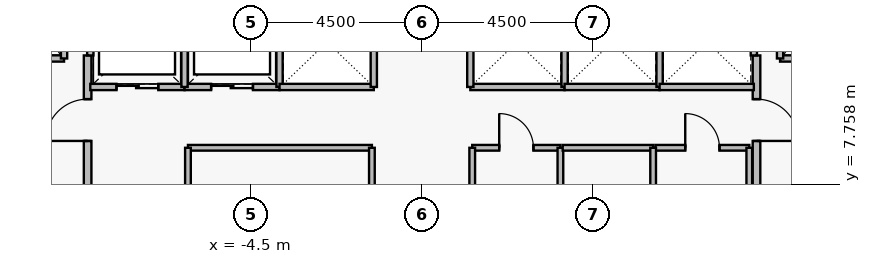
"""IFC4 building model, lengths in metres.
Left out: names, types, materials, properties, quantities, classifications, styles, units other than length and angle.
Written with IfcOpenShell. Run it as: python <this file> out.ifc"""

import sys

from ifc_helpers import new_model, si_unit, direction, frame, frame_2d, origin, place, context, subcontext, project, spatial, rectangle, extrude, element, fill, save


model = new_model("IFC4")
c1 = context("Model", 3, precision=1e-05, world=origin(), true_north=direction((0.0, 1.0)))
c2 = subcontext(c1, "Body", "Model", "MODEL_VIEW")
j1 = project(units=[si_unit("LENGTHUNIT", "METRE"), si_unit("PLANEANGLEUNIT", "RADIAN")], contexts=[c1])
p1 = place(None, origin())
s1 = spatial("IfcSite", under=j1, at=p1, CompositionType="ELEMENT")
p2 = place(p1, origin())
s2 = spatial("IfcBuilding", under=s1, at=p2, CompositionType="ELEMENT")
p3 = place(p2, frame((0.0, 0.0, 99.3)))
s3 = spatial("IfcBuildingStorey", under=s2, at=p3, CompositionType="ELEMENT", Elevation=99.3)
p4 = place(p3, frame((-8.8, 5.05, 0.0), z_axis=(0.0, 0.0, 1.0), x_axis=(0.0, 1.0, 0.0)))
e1 = element("IfcWall", 1, at=p4, inside=s3, PredefinedType="PARTITIONING", context=c2, shape_type="SweptSolid", body=[
    extrude(rectangle(XDim=6.1, YDim=0.2, at=frame_2d((3.05, 0.0))), origin(), (0.0, 0.0, 1.0), 3.43),
])
p5 = place(p4, frame((0.25, 0.0, 0.0)))
e2 = element("IfcOpeningElement", 2, at=p5, cuts=e1, PredefinedType="OPENING", context=c2, shape_type="SweptSolid", body=[
    extrude(rectangle(XDim=1.1, YDim=2.2, at=frame_2d((0.55, 1.1))), frame((0.0, 0.11, 0.0), z_axis=(0.0, -1.0, 0.0), x_axis=(1.0, 0.0, 0.0)), (0.0, 0.0, 1.0), 0.22),
])
p6 = place(p4, frame((3.85, 0.0, 0.0)))
e3 = element("IfcOpeningElement", 3, at=p6, cuts=e1, PredefinedType="OPENING", context=c2, shape_type="SweptSolid", body=[
    extrude(rectangle(XDim=1.1, YDim=2.2, at=frame_2d((0.55, 1.1))), frame((0.0, 0.11, 0.0), z_axis=(0.0, -1.0, 0.0), x_axis=(1.0, 0.0, 0.0)), (0.0, 0.0, 1.0), 0.22),
])
p7 = place(p3, frame((8.8, 11.15, 0.0), z_axis=(0.0, 0.0, 1.0), x_axis=(0.0, -1.0, 0.0)))
e4 = element("IfcWall", 4, at=p7, inside=s3, PredefinedType="PARTITIONING", context=c2, shape_type="SweptSolid", body=[
    extrude(rectangle(XDim=6.1, YDim=0.2, at=frame_2d((3.05, 0.0))), origin(), (0.0, 0.0, 1.0), 3.43),
])
p8 = place(p7, frame((1.15, 0.0, 0.0)))
e5 = element("IfcOpeningElement", 5, at=p8, cuts=e4, PredefinedType="OPENING", context=c2, shape_type="SweptSolid", body=[
    extrude(rectangle(XDim=1.1, YDim=2.2, at=frame_2d((0.55, 1.1))), frame((0.0, 0.11, 0.0), z_axis=(0.0, -1.0, 0.0), x_axis=(1.0, 0.0, 0.0)), (0.0, 0.0, 1.0), 0.22),
])
p9 = place(p7, frame((4.75, 0.0, 0.0)))
e6 = element("IfcOpeningElement", 6, at=p9, cuts=e4, PredefinedType="OPENING", context=c2, shape_type="SweptSolid", body=[
    extrude(rectangle(XDim=1.1, YDim=2.2, at=frame_2d((0.55, 1.1))), frame((0.0, 0.11, 0.0), z_axis=(0.0, -1.0, 0.0), x_axis=(1.0, 0.0, 0.0)), (0.0, 0.0, 1.0), 0.22),
])
p10 = place(p3, frame((-11.58, 11.07, 0.0), z_axis=(0.0, 0.0, 1.0), x_axis=(1.0, 0.0, 0.0)))
e7 = element("IfcWall", 7, at=p10, inside=s3, PredefinedType="PARTITIONING", context=c2, shape_type="SweptSolid", body=[
    extrude(rectangle(XDim=2.16, YDim=0.165, at=frame_2d((1.08, 0.0))), origin(), (0.0, 0.0, 1.0), 3.43),
])
p11 = place(p10, frame((0.53, 0.0, 0.0)))
e8 = element("IfcOpeningElement", 8, at=p11, cuts=e7, PredefinedType="OPENING", context=c2, shape_type="SweptSolid", body=[
    extrude(rectangle(XDim=1.15, YDim=2.25, at=frame_2d((0.575, 1.125))), frame((0.0, 0.093, 0.0), z_axis=(0.0, -1.0, 0.0), x_axis=(1.0, 0.0, 0.0)), (0.0, 0.0, 1.0), 0.185),
])
p12 = place(p3, frame((9.42, 11.07, 0.0), z_axis=(0.0, 0.0, 1.0), x_axis=(1.0, 0.0, 0.0)))
e9 = element("IfcWall", 9, at=p12, inside=s3, PredefinedType="PARTITIONING", context=c2, shape_type="SweptSolid", body=[
    extrude(rectangle(XDim=2.16, YDim=0.165, at=frame_2d((1.08, 0.0))), origin(), (0.0, 0.0, 1.0), 3.43),
])
p13 = place(p12, frame((0.53, 0.0, 0.0)))
e10 = element("IfcOpeningElement", 10, at=p13, cuts=e9, PredefinedType="OPENING", context=c2, shape_type="SweptSolid", body=[
    extrude(rectangle(XDim=1.15, YDim=2.25, at=frame_2d((0.575, 1.125))), frame((0.0, 0.093, 0.0), z_axis=(0.0, -1.0, 0.0), x_axis=(1.0, 0.0, 0.0)), (0.0, 0.0, 1.0), 0.185),
])
p14 = place(p3, frame((-8.73, 10.32, 0.0), z_axis=(0.0, 0.0, 1.0), x_axis=(1.0, 0.0, 0.0)))
e11 = element("IfcWall", 11, at=p14, inside=s3, PredefinedType="PARTITIONING", context=c2, shape_type="SweptSolid", body=[
    extrude(rectangle(XDim=2.48, YDim=0.165, at=frame_2d((1.24, 0.0))), origin(), (0.0, 0.0, 1.0), 3.43),
])
p15 = place(p14, frame((0.69, 0.0, 0.0)))
e12 = element("IfcOpeningElement", 12, at=p15, cuts=e11, PredefinedType="OPENING", context=c2, shape_type="SweptSolid", body=[
    extrude(rectangle(XDim=1.1, YDim=2.25, at=frame_2d((0.55, 1.125))), frame((0.0, 0.093, 0.0), z_axis=(0.0, -1.0, 0.0), x_axis=(1.0, 0.0, 0.0)), (0.0, 0.0, 1.0), 0.185),
])
p16 = place(p3, frame((-6.25, 10.32, 0.0), z_axis=(0.0, 0.0, 1.0), x_axis=(1.0, 0.0, 0.0)))
e13 = element("IfcWall", 13, at=p16, inside=s3, PredefinedType="PARTITIONING", context=c2, shape_type="SweptSolid", body=[
    extrude(rectangle(XDim=2.5, YDim=0.165, at=frame_2d((1.25, 0.0))), origin(), (0.0, 0.0, 1.0), 3.43),
])
p17 = place(p16, frame((0.7, 0.0, 0.0)))
e14 = element("IfcOpeningElement", 14, at=p17, cuts=e13, PredefinedType="OPENING", context=c2, shape_type="SweptSolid", body=[
    extrude(rectangle(XDim=1.1, YDim=2.25, at=frame_2d((0.55, 1.125))), frame((0.0, 0.093, 0.0), z_axis=(0.0, -1.0, 0.0), x_axis=(1.0, 0.0, 0.0)), (0.0, 0.0, 1.0), 0.185),
])
p18 = place(p3, frame((1.32, 8.72, 0.0), z_axis=(0.0, 0.0, 1.0), x_axis=(1.0, 0.0, 0.0)))
e15 = element("IfcWall", 15, at=p18, inside=s3, PredefinedType="PARTITIONING", context=c2, shape_type="SweptSolid", body=[
    extrude(rectangle(XDim=2.32, YDim=0.15, at=frame_2d((1.16, 0.0))), origin(), (0.0, 0.0, 1.0), 3.43),
])
p19 = place(p18, frame((0.71, 0.0, 0.0)))
e16 = element("IfcOpeningElement", 16, at=p19, cuts=e15, PredefinedType="OPENING", context=c2, shape_type="SweptSolid", body=[
    extrude(rectangle(XDim=0.9, YDim=2.15, at=frame_2d((0.45, 1.075))), frame((0.0, 0.085, 0.0), z_axis=(0.0, -1.0, 0.0), x_axis=(1.0, 0.0, 0.0)), (0.0, 0.0, 1.0), 0.17),
])
p20 = place(p3, frame((6.14, 8.72, 0.0), z_axis=(0.0, 0.0, 1.0), x_axis=(1.0, 0.0, 0.0)))
e17 = element("IfcWall", 17, at=p20, inside=s3, PredefinedType="PARTITIONING", context=c2, shape_type="SweptSolid", body=[
    extrude(rectangle(XDim=2.47, YDim=0.15, at=frame_2d((1.235, 0.0))), origin(), (0.0, 0.0, 1.0), 3.43),
])
p21 = place(p20, frame((0.785, 0.0, 0.0)))
e18 = element("IfcOpeningElement", 18, at=p21, cuts=e17, PredefinedType="OPENING", context=c2, shape_type="SweptSolid", body=[
    extrude(rectangle(XDim=0.9, YDim=2.15, at=frame_2d((0.45, 1.075))), frame((0.0, 0.085, 0.0), z_axis=(0.0, -1.0, 0.0), x_axis=(1.0, 0.0, 0.0)), (0.0, 0.0, 1.0), 0.17),
])
for number, where, z_axis, x_axis in (
    (19, (-9.42, 11.07, 0.0), (0.0, 0.0, 1.0), (0.0, 1.0, 0.0)),
    (20, (9.42, 11.07, 0.0), (0.0, 0.0, 1.0), (0.0, 1.0, 0.0)),
):
    element("IfcWall", number, at=place(p3, frame(where, z_axis=z_axis, x_axis=x_axis)), inside=s3, PredefinedType="PARTITIONING", context=c2, shape_type="SweptSolid", body=[
        extrude(rectangle(XDim=2.96, YDim=0.165, at=frame_2d((1.48, 0.0))), origin(), (0.0, 0.0, 1.0), 3.43),
    ])
p22 = place(p3, frame((-8.73, 11.15, 0.0), z_axis=(0.0, 0.0, 1.0), x_axis=(0.0, 1.0, 0.0)))
e21 = element("IfcWall", 21, at=p22, inside=s3, PredefinedType="PARTITIONING", context=c2, shape_type="SweptSolid", body=[
    extrude(rectangle(XDim=1.53, YDim=0.165, at=frame_2d((0.765, 0.0))), origin(), (0.0, 0.0, 1.0), 3.43),
])
for number, where, z_axis, x_axis in (
    (22, (-6.25, 10.32, 0.0), (0.0, 0.0, 1.0), (0.0, 1.0, 0.0)),
    (23, (-3.75, 10.32, 0.0), (0.0, 0.0, 1.0), (0.0, 1.0, 0.0)),
):
    element("IfcWall", number, at=place(p3, frame(where, z_axis=z_axis, x_axis=x_axis)), inside=s3, PredefinedType="PARTITIONING", context=c2, shape_type="SweptSolid", body=[
        extrude(rectangle(XDim=2.36, YDim=0.165, at=frame_2d((1.18, 0.0))), origin(), (0.0, 0.0, 1.0), 3.43),
    ])
p23 = place(p3, frame((-3.75, 10.32, 0.0), z_axis=(0.0, 0.0, 1.0), x_axis=(1.0, 0.0, 0.0)))
e24 = element("IfcWall", 24, at=p23, inside=s3, PredefinedType="PARTITIONING", context=c2, shape_type="SweptSolid", body=[
    extrude(rectangle(XDim=2.48, YDim=0.165, at=frame_2d((1.24, 0.0))), origin(), (0.0, 0.0, 1.0), 3.43),
])
p24 = place(p3, frame((-1.27, 10.32, 0.0), z_axis=(0.0, 0.0, 1.0), x_axis=(0.0, 1.0, 0.0)))
e25 = element("IfcWall", 25, at=p24, inside=s3, PredefinedType="PARTITIONING", context=c2, shape_type="SweptSolid", body=[
    extrude(rectangle(XDim=2.36, YDim=0.165, at=frame_2d((1.18, 0.0))), origin(), (0.0, 0.0, 1.0), 3.43),
])
p25 = place(p3, frame((1.27, 10.32, 0.0), z_axis=(0.0, 0.0, 1.0), x_axis=(1.0, 0.0, 0.0)))
e26 = element("IfcWall", 26, at=p25, inside=s3, PredefinedType="PARTITIONING", context=c2, shape_type="SweptSolid", body=[
    extrude(rectangle(XDim=2.48, YDim=0.165, at=frame_2d((1.24, 0.0))), origin(), (0.0, 0.0, 1.0), 3.43),
])
for number, where, z_axis, x_axis in (
    (27, (1.27, 10.32, 0.0), (0.0, 0.0, 1.0), (0.0, 1.0, 0.0)),
    (28, (3.75, 10.32, 0.0), (0.0, 0.0, 1.0), (0.0, 1.0, 0.0)),
):
    element("IfcWall", number, at=place(p3, frame(where, z_axis=z_axis, x_axis=x_axis)), inside=s3, PredefinedType="PARTITIONING", context=c2, shape_type="SweptSolid", body=[
        extrude(rectangle(XDim=2.36, YDim=0.165, at=frame_2d((1.18, 0.0))), origin(), (0.0, 0.0, 1.0), 3.43),
    ])
p26 = place(p3, frame((3.75, 10.32, 0.0), z_axis=(0.0, 0.0, 1.0), x_axis=(1.0, 0.0, 0.0)))
e29 = element("IfcWall", 29, at=p26, inside=s3, PredefinedType="PARTITIONING", context=c2, shape_type="SweptSolid", body=[
    extrude(rectangle(XDim=2.5, YDim=0.165, at=frame_2d((1.25, 0.0))), origin(), (0.0, 0.0, 1.0), 3.43),
])
p27 = place(p3, frame((6.25, 10.32, 0.0), z_axis=(0.0, 0.0, 1.0), x_axis=(0.0, 1.0, 0.0)))
e30 = element("IfcWall", 30, at=p27, inside=s3, PredefinedType="PARTITIONING", context=c2, shape_type="SweptSolid", body=[
    extrude(rectangle(XDim=2.36, YDim=0.165, at=frame_2d((1.18, 0.0))), origin(), (0.0, 0.0, 1.0), 3.43),
])
p28 = place(p3, frame((6.25, 10.32, 0.0), z_axis=(0.0, 0.0, 1.0), x_axis=(1.0, 0.0, 0.0)))
e31 = element("IfcWall", 31, at=p28, inside=s3, PredefinedType="PARTITIONING", context=c2, shape_type="SweptSolid", body=[
    extrude(rectangle(XDim=2.48, YDim=0.165, at=frame_2d((1.24, 0.0))), origin(), (0.0, 0.0, 1.0), 3.43),
])
p29 = place(p3, frame((8.73, 11.15, 0.0), z_axis=(0.0, 0.0, 1.0), x_axis=(0.0, 1.0, 0.0)))
e32 = element("IfcWall", 32, at=p29, inside=s3, PredefinedType="PARTITIONING", context=c2, shape_type="SweptSolid", body=[
    extrude(rectangle(XDim=1.53, YDim=0.165, at=frame_2d((0.765, 0.0))), origin(), (0.0, 0.0, 1.0), 3.43),
])
p30 = place(p3, frame((-6.16, 8.72, 0.0), z_axis=(0.0, 0.0, 1.0), x_axis=(1.0, 0.0, 0.0)))
e33 = element("IfcWall", 33, at=p30, inside=s3, PredefinedType="PARTITIONING", context=c2, shape_type="SweptSolid", body=[
    extrude(rectangle(XDim=4.84, YDim=0.15, at=frame_2d((2.42, 0.0))), origin(), (0.0, 0.0, 1.0), 3.43),
])
for number, where, z_axis, x_axis in (
    (34, (-6.16, 6.48, 0.0), (0.0, 0.0, 1.0), (0.0, 1.0, 0.0)),
    (35, (-1.32, 6.48, 0.0), (0.0, 0.0, 1.0), (0.0, 1.0, 0.0)),
    (36, (1.32, 6.48, 0.0), (0.0, 0.0, 1.0), (0.0, 1.0, 0.0)),
    (37, (3.64, 6.48, 0.0), (0.0, 0.0, 1.0), (0.0, 1.0, 0.0)),
):
    element("IfcWall", number, at=place(p3, frame(where, z_axis=z_axis, x_axis=x_axis)), inside=s3, PredefinedType="PARTITIONING", context=c2, shape_type="SweptSolid", body=[
        extrude(rectangle(XDim=2.24, YDim=0.15, at=frame_2d((1.12, 0.0))), origin(), (0.0, 0.0, 1.0), 3.43),
    ])
p31 = place(p3, frame((3.7, 8.72, 0.0), z_axis=(0.0, 0.0, 1.0), x_axis=(1.0, 0.0, 0.0)))
e38 = element("IfcWall", 38, at=p31, inside=s3, PredefinedType="PARTITIONING", context=c2, shape_type="SweptSolid", body=[
    extrude(rectangle(XDim=2.38, YDim=0.15, at=frame_2d((1.19, 0.0))), origin(), (0.0, 0.0, 1.0), 3.43),
])
for number, where, z_axis, x_axis in (
    (39, (6.08, 6.48, 0.0), (0.0, 0.0, 1.0), (0.0, 1.0, 0.0)),
    (40, (8.61, 6.48, 0.0), (0.0, 0.0, 1.0), (0.0, 1.0, 0.0)),
):
    element("IfcWall", number, at=place(p3, frame(where, z_axis=z_axis, x_axis=x_axis)), inside=s3, PredefinedType="PARTITIONING", context=c2, shape_type="SweptSolid", body=[
        extrude(rectangle(XDim=2.24, YDim=0.15, at=frame_2d((1.12, 0.0))), origin(), (0.0, 0.0, 1.0), 3.43),
    ])
p32 = place(p6, origin())
e41 = element("IfcDoor", 41, at=p32, inside=s3, OperationType="SINGLE_SWING_LEFT", PredefinedType="DOOR", context=c2, shape_type="SweptSolid", body=[
    extrude(rectangle(XDim=1.1, YDim=2.2, at=frame_2d((0.55, 1.1))), frame((0.0, 0.025, 0.0), z_axis=(0.0, -1.0, 0.0), x_axis=(1.0, 0.0, 0.0)), (0.0, 0.0, 1.0), 0.05),
])
fill(e3, e41)
p33 = place(p8, origin())
e42 = element("IfcDoor", 42, at=p33, inside=s3, OperationType="SINGLE_SWING_RIGHT", PredefinedType="DOOR", context=c2, shape_type="SweptSolid", body=[
    extrude(rectangle(XDim=1.1, YDim=2.2, at=frame_2d((0.55, 1.1))), frame((0.0, 0.025, 0.0), z_axis=(0.0, -1.0, 0.0), x_axis=(1.0, 0.0, 0.0)), (0.0, 0.0, 1.0), 0.05),
])
fill(e5, e42)
p34 = place(p15, origin())
e43 = element("IfcDoor", 43, at=p34, inside=s3, OperationType="SLIDING_TO_LEFT", PredefinedType="DOOR", context=c2, shape_type="SweptSolid", body=[
    extrude(rectangle(XDim=1.1, YDim=2.25, at=frame_2d((0.55, 1.125))), frame((0.0, 0.025, 0.0), z_axis=(0.0, -1.0, 0.0), x_axis=(1.0, 0.0, 0.0)), (0.0, 0.0, 1.0), 0.05),
])
fill(e12, e43)
p35 = place(p17, origin())
e44 = element("IfcDoor", 44, at=p35, inside=s3, OperationType="SLIDING_TO_LEFT", PredefinedType="DOOR", context=c2, shape_type="SweptSolid", body=[
    extrude(rectangle(XDim=1.1, YDim=2.25, at=frame_2d((0.55, 1.125))), frame((0.0, 0.025, 0.0), z_axis=(0.0, -1.0, 0.0), x_axis=(1.0, 0.0, 0.0)), (0.0, 0.0, 1.0), 0.05),
])
fill(e14, e44)
p36 = place(p19, origin())
e45 = element("IfcDoor", 45, at=p36, inside=s3, OperationType="SINGLE_SWING_LEFT", PredefinedType="DOOR", context=c2, shape_type="SweptSolid", body=[
    extrude(rectangle(XDim=0.9, YDim=2.15, at=frame_2d((0.45, 1.075))), frame((0.0, 0.025, 0.0), z_axis=(0.0, -1.0, 0.0), x_axis=(1.0, 0.0, 0.0)), (0.0, 0.0, 1.0), 0.05),
])
fill(e16, e45)
p37 = place(p21, origin())
e46 = element("IfcDoor", 46, at=p37, inside=s3, OperationType="SINGLE_SWING_LEFT", PredefinedType="DOOR", context=c2, shape_type="SweptSolid", body=[
    extrude(rectangle(XDim=0.9, YDim=2.15, at=frame_2d((0.45, 1.075))), frame((0.0, 0.025, 0.0), z_axis=(0.0, -1.0, 0.0), x_axis=(1.0, 0.0, 0.0)), (0.0, 0.0, 1.0), 0.05),
])
fill(e18, e46)
save(model, sys.argv[1])
